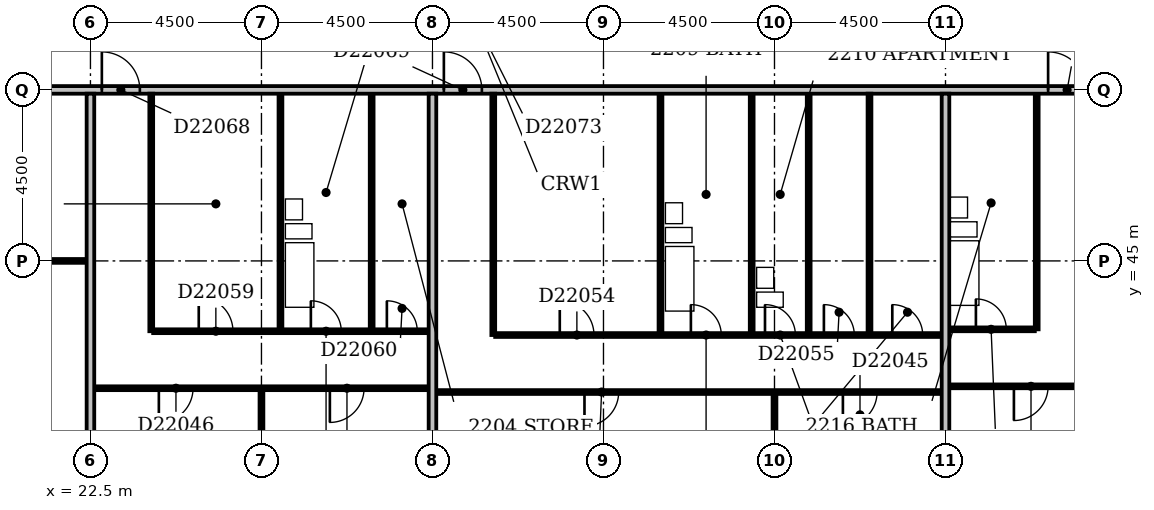
"""IFC4 building model, lengths in metres.
Left out: names, types, materials, properties, quantities, classifications, styles, units other than length and angle.
Written with IfcOpenShell. Run it as: python <this file> out.ifc"""

import sys

from ifc_helpers import new_model, si_unit, direction, frame, frame_2d, origin, place, context, subcontext, project, spatial, rectangle, extrude, element, fill, save


model = new_model("IFC4")
c1 = context("Model", 3, precision=1e-05, world=origin(), true_north=direction((0.0, 1.0)))
c2 = subcontext(c1, "Body", "Model", "MODEL_VIEW")
j1 = project(units=[si_unit("LENGTHUNIT", "METRE"), si_unit("PLANEANGLEUNIT", "RADIAN")], contexts=[c1])
p1 = place(None, origin())
s1 = spatial("IfcSite", under=j1, at=p1, CompositionType="ELEMENT")
p2 = place(p1, origin())
s2 = spatial("IfcBuilding", under=s1, at=p2, CompositionType="ELEMENT")
p3 = place(p2, frame((0.0, 0.0, 90.2)))
s3 = spatial("IfcBuildingStorey", under=s2, at=p3, CompositionType="ELEMENT", Elevation=90.2)
p4 = place(p3, frame((22.5, 36.6, 0.0), z_axis=(0.0, 0.0, 1.0), x_axis=(0.0, 1.0, 0.0)))
e1 = element("IfcWall", 1, at=p4, inside=s3, PredefinedType="PARTITIONING", context=c2, shape_type="SweptSolid", body=[
    extrude(rectangle(XDim=12.8, YDim=0.2, at=frame_2d((6.4, 0.0))), origin(), (0.0, 0.0, 1.0), 3.3),
])
p5 = place(p3, frame((27.0, 36.6, 0.0), z_axis=(0.0, 0.0, 1.0), x_axis=(0.0, 1.0, 0.0)))
e2 = element("IfcWall", 2, at=p5, inside=s3, PredefinedType="PARTITIONING", context=c2, shape_type="SweptSolid", body=[
    extrude(rectangle(XDim=5.0, YDim=0.1, at=frame_2d((2.5, 0.0))), origin(), (0.0, 0.0, 1.0), 2.6),
])
p6 = place(p3, frame((31.5, 36.6, 0.0), z_axis=(0.0, 0.0, 1.0), x_axis=(0.0, 1.0, 0.0)))
e3 = element("IfcWall", 3, at=p6, inside=s3, PredefinedType="PARTITIONING", context=c2, shape_type="SweptSolid", body=[
    extrude(rectangle(XDim=12.8, YDim=0.2, at=frame_2d((6.4, 0.0))), origin(), (0.0, 0.0, 1.0), 3.3),
])
p7 = place(p3, frame((40.5, 36.6, 0.0), z_axis=(0.0, 0.0, 1.0), x_axis=(0.0, 1.0, 0.0)))
e4 = element("IfcWall", 4, at=p7, inside=s3, PredefinedType="PARTITIONING", context=c2, shape_type="SweptSolid", body=[
    extrude(rectangle(XDim=4.9, YDim=0.1, at=frame_2d((2.45, 0.0))), origin(), (0.0, 0.0, 1.0), 3.3),
])
p8 = place(p3, frame((45.0, 36.6, 0.0), z_axis=(0.0, 0.0, 1.0), x_axis=(0.0, 1.0, 0.0)))
e5 = element("IfcWall", 5, at=p8, inside=s3, PredefinedType="PARTITIONING", context=c2, shape_type="SweptSolid", body=[
    extrude(rectangle(XDim=12.8, YDim=0.2, at=frame_2d((6.4, 0.0))), origin(), (0.0, 0.0, 1.0), 2.6),
])
p9 = place(p3, frame((31.6, 41.55, 0.0), z_axis=(0.0, 0.0, 1.0), x_axis=(1.0, 0.0, 0.0)))
e6 = element("IfcWall", 6, at=p9, inside=s3, PredefinedType="PARTITIONING", context=c2, shape_type="SweptSolid", body=[
    extrude(rectangle(XDim=13.3, YDim=0.1, at=frame_2d((6.65, 0.0))), origin(), (0.0, 0.0, 1.0), 3.3),
])
p10 = place(p9, frame((3.9, 0.0, 0.0)))
e7 = element("IfcOpeningElement", 7, at=p10, cuts=e6, PredefinedType="OPENING", context=c2, shape_type="SweptSolid", body=[
    extrude(rectangle(XDim=0.9, YDim=2.1, at=frame_2d((0.45, 1.05))), frame((0.0, 0.062, 0.0), z_axis=(0.0, -1.0, 0.0), x_axis=(1.0, 0.0, 0.0)), (0.0, 0.0, 1.0), 0.124),
])
p11 = place(p9, frame((10.7, 0.0, 0.0)))
e8 = element("IfcOpeningElement", 8, at=p11, cuts=e6, PredefinedType="OPENING", context=c2, shape_type="SweptSolid", body=[
    extrude(rectangle(XDim=0.9, YDim=2.1, at=frame_2d((0.45, 1.05))), frame((0.0, 0.062, 0.0), z_axis=(0.0, -1.0, 0.0), x_axis=(1.0, 0.0, 0.0)), (0.0, 0.0, 1.0), 0.124),
])
p12 = place(p3, frame((22.6, 41.65, 0.0), z_axis=(0.0, 0.0, 1.0), x_axis=(1.0, 0.0, 0.0)))
e9 = element("IfcWall", 9, at=p12, inside=s3, PredefinedType="PARTITIONING", context=c2, shape_type="SweptSolid", body=[
    extrude(rectangle(XDim=8.8, YDim=0.1, at=frame_2d((4.4, 0.0))), origin(), (0.0, 0.0, 1.0), 3.3),
])
p13 = place(p12, frame((1.7, 0.0, 0.0)))
e10 = element("IfcOpeningElement", 10, at=p13, cuts=e9, PredefinedType="OPENING", context=c2, shape_type="SweptSolid", body=[
    extrude(rectangle(XDim=0.9, YDim=2.1, at=frame_2d((0.45, 1.05))), frame((0.0, 0.062, 0.0), z_axis=(0.0, -1.0, 0.0), x_axis=(1.0, 0.0, 0.0)), (0.0, 0.0, 1.0), 0.124),
])
p14 = place(p12, frame((6.2, 0.0, 0.0)))
e11 = element("IfcOpeningElement", 11, at=p14, cuts=e9, PredefinedType="OPENING", context=c2, shape_type="SweptSolid", body=[
    extrude(rectangle(XDim=0.9, YDim=2.1, at=frame_2d((0.45, 1.05))), frame((0.0, 0.062, 0.0), z_axis=(0.0, -1.0, 0.0), x_axis=(1.0, 0.0, 0.0)), (0.0, 0.0, 1.0), 0.124),
])
p15 = place(p3, frame((45.1, 41.7, 0.0), z_axis=(0.0, 0.0, 1.0), x_axis=(1.0, 0.0, 0.0)))
e12 = element("IfcWall", 12, at=p15, inside=s3, PredefinedType="PARTITIONING", context=c2, shape_type="SweptSolid", body=[
    extrude(rectangle(XDim=17.8, YDim=0.1, at=frame_2d((8.9, 0.0))), origin(), (0.0, 0.0, 1.0), 3.3),
])
p16 = place(p15, frame((1.7, 0.0, 0.0)))
e13 = element("IfcOpeningElement", 13, at=p16, cuts=e12, PredefinedType="OPENING", context=c2, shape_type="SweptSolid", body=[
    extrude(rectangle(XDim=0.9, YDim=2.1, at=frame_2d((0.45, 1.05))), frame((0.0, 0.062, 0.0), z_axis=(0.0, -1.0, 0.0), x_axis=(1.0, 0.0, 0.0)), (0.0, 0.0, 1.0), 0.124),
])
p17 = place(p15, frame((6.2, 0.0, 0.0)))
e14 = element("IfcOpeningElement", 14, at=p17, cuts=e12, PredefinedType="OPENING", context=c2, shape_type="SweptSolid", body=[
    extrude(rectangle(XDim=0.9, YDim=2.1, at=frame_2d((0.45, 1.05))), frame((0.0, 0.062, 0.0), z_axis=(0.0, -1.0, 0.0), x_axis=(1.0, 0.0, 0.0)), (0.0, 0.0, 1.0), 0.124),
])
p18 = place(p15, frame((11.85, 0.0, 0.0)))
e15 = element("IfcOpeningElement", 15, at=p18, cuts=e12, PredefinedType="OPENING", context=c2, shape_type="SweptSolid", body=[
    extrude(rectangle(XDim=0.9, YDim=2.1, at=frame_2d((0.45, 1.05))), frame((0.0, 0.062, 0.0), z_axis=(0.0, -1.0, 0.0), x_axis=(1.0, 0.0, 0.0)), (0.0, 0.0, 1.0), 0.124),
])
p19 = place(p15, frame((15.2, 0.0, 0.0)))
e16 = element("IfcOpeningElement", 16, at=p19, cuts=e12, PredefinedType="OPENING", context=c2, shape_type="SweptSolid", body=[
    extrude(rectangle(XDim=0.9, YDim=2.1, at=frame_2d((0.45, 1.05))), frame((0.0, 0.062, 0.0), z_axis=(0.0, -1.0, 0.0), x_axis=(1.0, 0.0, 0.0)), (0.0, 0.0, 1.0), 0.124),
])
p20 = place(p3, frame((33.1, 43.05, 0.0), z_axis=(0.0, 0.0, 1.0), x_axis=(0.0, 1.0, 0.0)))
e17 = element("IfcWall", 17, at=p20, inside=s3, PredefinedType="PARTITIONING", context=c2, shape_type="SweptSolid", body=[
    extrude(rectangle(XDim=6.35, YDim=0.1, at=frame_2d((3.175, 0.0))), origin(), (0.0, 0.0, 1.0), 3.3),
])
p21 = place(p3, frame((33.15, 43.05, 0.0), z_axis=(0.0, 0.0, 1.0), x_axis=(1.0, 0.0, 0.0)))
e18 = element("IfcWall", 18, at=p21, inside=s3, PredefinedType="PARTITIONING", context=c2, shape_type="SweptSolid", body=[
    extrude(rectangle(XDim=11.75, YDim=0.1, at=frame_2d((5.875, 0.0))), origin(), (0.0, 0.0, 1.0), 3.3),
])
p22 = place(p21, frame((5.15, 0.0, 0.0)))
e19 = element("IfcOpeningElement", 19, at=p22, cuts=e18, PredefinedType="OPENING", context=c2, shape_type="SweptSolid", body=[
    extrude(rectangle(XDim=0.8, YDim=2.1, at=frame_2d((0.4, 1.05))), frame((0.0, 0.062, 0.0), z_axis=(0.0, -1.0, 0.0), x_axis=(1.0, 0.0, 0.0)), (0.0, 0.0, 1.0), 0.124),
])
p23 = place(p21, frame((1.7, 0.0, 0.0)))
e20 = element("IfcOpeningElement", 20, at=p23, cuts=e18, PredefinedType="OPENING", context=c2, shape_type="SweptSolid", body=[
    extrude(rectangle(XDim=0.9, YDim=2.1, at=frame_2d((0.45, 1.05))), frame((0.0, 0.062, 0.0), z_axis=(0.0, -1.0, 0.0), x_axis=(1.0, 0.0, 0.0)), (0.0, 0.0, 1.0), 0.124),
])
p24 = place(p21, frame((8.65, 0.0, 0.0)))
e21 = element("IfcOpeningElement", 21, at=p24, cuts=e18, PredefinedType="OPENING", context=c2, shape_type="SweptSolid", body=[
    extrude(rectangle(XDim=0.8, YDim=2.1, at=frame_2d((0.4, 1.05))), frame((0.0, 0.062, 0.0), z_axis=(0.0, -1.0, 0.0), x_axis=(1.0, 0.0, 0.0)), (0.0, 0.0, 1.0), 0.124),
])
p25 = place(p21, frame((10.45, 0.0, 0.0)))
e22 = element("IfcOpeningElement", 22, at=p25, cuts=e18, PredefinedType="OPENING", context=c2, shape_type="SweptSolid", body=[
    extrude(rectangle(XDim=0.8, YDim=2.1, at=frame_2d((0.4, 1.05))), frame((0.0, 0.062, 0.0), z_axis=(0.0, -1.0, 0.0), x_axis=(1.0, 0.0, 0.0)), (0.0, 0.0, 1.0), 0.124),
])
p26 = place(p21, frame((7.1, 0.0, 0.0)))
e23 = element("IfcOpeningElement", 23, at=p26, cuts=e18, PredefinedType="OPENING", context=c2, shape_type="SweptSolid", body=[
    extrude(rectangle(XDim=0.8, YDim=2.1, at=frame_2d((0.4, 1.05))), frame((0.0, 0.062, 0.0), z_axis=(0.0, -1.0, 0.0), x_axis=(1.0, 0.0, 0.0)), (0.0, 0.0, 1.0), 0.124),
])
for number, where, z_axis, x_axis in (
    (24, (37.5, 43.1, 0.0), (0.0, 0.0, 1.0), (0.0, 1.0, 0.0)),
    (25, (39.9, 43.1, 0.0), (0.0, 0.0, 1.0), (0.0, 1.0, 0.0)),
    (26, (41.4, 43.1, 0.0), (0.0, 0.0, 1.0), (0.0, 1.0, 0.0)),
):
    element("IfcWall", number, at=place(p3, frame(where, z_axis=z_axis, x_axis=x_axis)), inside=s3, PredefinedType="PLUMBINGWALL", context=c2, shape_type="SweptSolid", body=[
        extrude(rectangle(XDim=6.3, YDim=0.1, at=frame_2d((3.15, 0.0))), origin(), (0.0, 0.0, 1.0), 3.3),
    ])
p27 = place(p3, frame((43.0, 43.1, 0.0), z_axis=(0.0, 0.0, 1.0), x_axis=(0.0, 1.0, 0.0)))
e27 = element("IfcWall", 27, at=p27, inside=s3, PredefinedType="PARTITIONING", context=c2, shape_type="SweptSolid", body=[
    extrude(rectangle(XDim=6.3, YDim=0.1, at=frame_2d((3.15, 0.0))), origin(), (0.0, 0.0, 1.0), 3.3),
])
p28 = place(p3, frame((24.1, 43.15, 0.0), z_axis=(0.0, 0.0, 1.0), x_axis=(0.0, 1.0, 0.0)))
e28 = element("IfcWall", 28, at=p28, inside=s3, PredefinedType="PARTITIONING", context=c2, shape_type="SweptSolid", body=[
    extrude(rectangle(XDim=6.25, YDim=0.1, at=frame_2d((3.125, 0.0))), origin(), (0.0, 0.0, 1.0), 3.3),
])
p29 = place(p3, frame((24.15, 43.15, 0.0), z_axis=(0.0, 0.0, 1.0), x_axis=(1.0, 0.0, 0.0)))
e29 = element("IfcWall", 29, at=p29, inside=s3, PredefinedType="PARTITIONING", context=c2, shape_type="SweptSolid", body=[
    extrude(rectangle(XDim=7.25, YDim=0.1, at=frame_2d((3.625, 0.0))), origin(), (0.0, 0.0, 1.0), 3.3),
])
p30 = place(p29, frame((4.15, 0.0, 0.0)))
e30 = element("IfcOpeningElement", 30, at=p30, cuts=e29, PredefinedType="OPENING", context=c2, shape_type="SweptSolid", body=[
    extrude(rectangle(XDim=0.8, YDim=2.1, at=frame_2d((0.4, 1.05))), frame((0.0, 0.062, 0.0), z_axis=(0.0, -1.0, 0.0), x_axis=(1.0, 0.0, 0.0)), (0.0, 0.0, 1.0), 0.124),
])
p31 = place(p29, frame((1.2, 0.0, 0.0)))
e31 = element("IfcOpeningElement", 31, at=p31, cuts=e29, PredefinedType="OPENING", context=c2, shape_type="SweptSolid", body=[
    extrude(rectangle(XDim=0.9, YDim=2.1, at=frame_2d((0.45, 1.05))), frame((0.0, 0.062, 0.0), z_axis=(0.0, -1.0, 0.0), x_axis=(1.0, 0.0, 0.0)), (0.0, 0.0, 1.0), 0.124),
])
p32 = place(p29, frame((6.15, 0.0, 0.0)))
e32 = element("IfcOpeningElement", 32, at=p32, cuts=e29, PredefinedType="OPENING", context=c2, shape_type="SweptSolid", body=[
    extrude(rectangle(XDim=0.8, YDim=2.1, at=frame_2d((0.4, 1.05))), frame((0.0, 0.062, 0.0), z_axis=(0.0, -1.0, 0.0), x_axis=(1.0, 0.0, 0.0)), (0.0, 0.0, 1.0), 0.124),
])
p33 = place(p3, frame((27.5, 43.2, 0.0), z_axis=(0.0, 0.0, 1.0), x_axis=(0.0, 1.0, 0.0)))
e33 = element("IfcWall", 33, at=p33, inside=s3, PredefinedType="PLUMBINGWALL", context=c2, shape_type="SweptSolid", body=[
    extrude(rectangle(XDim=6.2, YDim=0.1, at=frame_2d((3.1, 0.0))), origin(), (0.0, 0.0, 1.0), 2.6),
])
p34 = place(p3, frame((29.9, 43.2, 0.0), z_axis=(0.0, 0.0, 1.0), x_axis=(0.0, 1.0, 0.0)))
e34 = element("IfcWall", 34, at=p34, inside=s3, PredefinedType="PLUMBINGWALL", context=c2, shape_type="SweptSolid", body=[
    extrude(rectangle(XDim=6.2, YDim=0.1, at=frame_2d((3.1, 0.0))), origin(), (0.0, 0.0, 1.0), 3.3),
])
p35 = place(p3, frame((45.1, 43.2, 0.0), z_axis=(0.0, 0.0, 1.0), x_axis=(1.0, 0.0, 0.0)))
e35 = element("IfcWall", 35, at=p35, inside=s3, PredefinedType="PARTITIONING", context=c2, shape_type="SweptSolid", body=[
    extrude(rectangle(XDim=2.25, YDim=0.1, at=frame_2d((1.125, 0.0))), origin(), (0.0, 0.0, 1.0), 3.3),
])
p36 = place(p35, frame((0.7, 0.0, 0.0)))
e36 = element("IfcOpeningElement", 36, at=p36, cuts=e35, PredefinedType="OPENING", context=c2, shape_type="SweptSolid", body=[
    extrude(rectangle(XDim=0.8, YDim=2.1, at=frame_2d((0.4, 1.05))), frame((0.0, 0.062, 0.0), z_axis=(0.0, -1.0, 0.0), x_axis=(1.0, 0.0, 0.0)), (0.0, 0.0, 1.0), 0.124),
])
p37 = place(p3, frame((47.4, 43.2, 0.0), z_axis=(0.0, 0.0, 1.0), x_axis=(0.0, 1.0, 0.0)))
e37 = element("IfcWall", 37, at=p37, inside=s3, PredefinedType="PLUMBINGWALL", context=c2, shape_type="SweptSolid", body=[
    extrude(rectangle(XDim=6.2, YDim=0.1, at=frame_2d((3.1, 0.0))), origin(), (0.0, 0.0, 1.0), 3.3),
])
p38 = place(p3, frame((9.1, 45.0, 0.0), z_axis=(0.0, 0.0, 1.0), x_axis=(1.0, 0.0, 0.0)))
e38 = element("IfcWall", 38, at=p38, inside=s3, PredefinedType="PARTITIONING", context=c2, shape_type="SweptSolid", body=[
    extrude(rectangle(XDim=13.3, YDim=0.1, at=frame_2d((6.65, 0.0))), origin(), (0.0, 0.0, 1.0), 3.3),
])
p39 = place(p3, frame((9.1, 49.5, 0.0), z_axis=(0.0, 0.0, 1.0), x_axis=(1.0, 0.0, 0.0)))
e39 = element("IfcWall", 39, at=p39, inside=s3, PredefinedType="PARTITIONING", context=c2, shape_type="SweptSolid", body=[
    extrude(rectangle(XDim=57.8, YDim=0.2, at=frame_2d((28.9, 0.0))), origin(), (0.0, 0.0, 1.0), 3.3),
])
p40 = place(p39, frame((13.7, 0.0, 0.0)))
e40 = element("IfcOpeningElement", 40, at=p40, cuts=e39, PredefinedType="OPENING", context=c2, shape_type="SweptSolid", body=[
    extrude(rectangle(XDim=1.0, YDim=2.1, at=frame_2d((0.5, 1.05))), frame((0.0, 0.112, 0.0), z_axis=(0.0, -1.0, 0.0), x_axis=(1.0, 0.0, 0.0)), (0.0, 0.0, 1.0), 0.224),
])
p41 = place(p39, frame((22.7, 0.0, 0.0)))
e41 = element("IfcOpeningElement", 41, at=p41, cuts=e39, PredefinedType="OPENING", context=c2, shape_type="SweptSolid", body=[
    extrude(rectangle(XDim=1.0, YDim=2.1, at=frame_2d((0.5, 1.05))), frame((0.0, 0.112, 0.0), z_axis=(0.0, -1.0, 0.0), x_axis=(1.0, 0.0, 0.0)), (0.0, 0.0, 1.0), 0.224),
])
p42 = place(p39, frame((38.6, 0.0, 0.0)))
e42 = element("IfcOpeningElement", 42, at=p42, cuts=e39, PredefinedType="OPENING", context=c2, shape_type="SweptSolid", body=[
    extrude(rectangle(XDim=1.0, YDim=2.1, at=frame_2d((0.5, 1.05))), frame((0.0, 0.112, 0.0), z_axis=(0.0, -1.0, 0.0), x_axis=(1.0, 0.0, 0.0)), (0.0, 0.0, 1.0), 0.224),
])
p43 = place(p39, frame((55.45, 0.0, 0.0)))
e43 = element("IfcOpeningElement", 43, at=p43, cuts=e39, PredefinedType="OPENING", context=c2, shape_type="SweptSolid", body=[
    extrude(rectangle(XDim=1.0, YDim=2.1, at=frame_2d((0.5, 1.05))), frame((0.0, 0.112, 0.0), z_axis=(0.0, -1.0, 0.0), x_axis=(1.0, 0.0, 0.0)), (0.0, 0.0, 1.0), 0.224),
])
p44 = place(p39, frame((6.15, 0.0, 0.0)))
e44 = element("IfcOpeningElement", 44, at=p44, cuts=e39, PredefinedType="OPENING", context=c2, shape_type="SweptSolid", body=[
    extrude(rectangle(XDim=0.9, YDim=2.1, at=frame_2d((0.45, 1.05))), frame((0.0, 0.112, 0.0), z_axis=(0.0, -1.0, 0.0), x_axis=(1.0, 0.0, 0.0)), (0.0, 0.0, 1.0), 0.224),
])
p45 = place(p10, frame((0.9, 0.0, 0.0), z_axis=(0.0, 0.0, 1.0), x_axis=(-1.0, 0.0, 0.0)))
e45 = element("IfcDoor", 45, at=p45, inside=s3, OperationType="SINGLE_SWING_RIGHT", PredefinedType="DOOR", context=c2, shape_type="SweptSolid", body=[
    extrude(rectangle(XDim=0.9, YDim=2.1, at=frame_2d((0.45, 1.05))), frame((0.0, 0.025, 0.0), z_axis=(0.0, -1.0, 0.0), x_axis=(1.0, 0.0, 0.0)), (0.0, 0.0, 1.0), 0.05),
])
fill(e7, e45)
p46 = place(p11, frame((0.9, 0.0, 0.0), z_axis=(0.0, 0.0, 1.0), x_axis=(-1.0, 0.0, 0.0)))
e46 = element("IfcDoor", 46, at=p46, inside=s3, OperationType="SINGLE_SWING_RIGHT", PredefinedType="DOOR", context=c2, shape_type="SweptSolid", body=[
    extrude(rectangle(XDim=0.9, YDim=2.1, at=frame_2d((0.45, 1.05))), frame((0.0, 0.025, 0.0), z_axis=(0.0, -1.0, 0.0), x_axis=(1.0, 0.0, 0.0)), (0.0, 0.0, 1.0), 0.05),
])
fill(e8, e46)
p47 = place(p13, frame((0.9, 0.0, 0.0), z_axis=(0.0, 0.0, 1.0), x_axis=(-1.0, 0.0, 0.0)))
e47 = element("IfcDoor", 47, at=p47, inside=s3, OperationType="SINGLE_SWING_RIGHT", PredefinedType="DOOR", context=c2, shape_type="SweptSolid", body=[
    extrude(rectangle(XDim=0.9, YDim=2.1, at=frame_2d((0.45, 1.05))), frame((0.0, 0.025, 0.0), z_axis=(0.0, -1.0, 0.0), x_axis=(1.0, 0.0, 0.0)), (0.0, 0.0, 1.0), 0.05),
])
fill(e10, e47)
p48 = place(p14, frame((0.9, 0.0, 0.0), z_axis=(0.0, 0.0, 1.0), x_axis=(-1.0, 0.0, 0.0)))
e48 = element("IfcDoor", 48, at=p48, inside=s3, OperationType="SINGLE_SWING_RIGHT", PredefinedType="DOOR", context=c2, shape_type="SweptSolid", body=[
    extrude(rectangle(XDim=0.9, YDim=2.1, at=frame_2d((0.45, 1.05))), frame((0.0, 0.025, 0.0), z_axis=(0.0, -1.0, 0.0), x_axis=(1.0, 0.0, 0.0)), (0.0, 0.0, 1.0), 0.05),
])
fill(e11, e48)
p49 = place(p16, frame((0.9, 0.0, 0.0), z_axis=(0.0, 0.0, 1.0), x_axis=(-1.0, 0.0, 0.0)))
e49 = element("IfcDoor", 49, at=p49, inside=s3, OperationType="SINGLE_SWING_RIGHT", PredefinedType="DOOR", context=c2, shape_type="SweptSolid", body=[
    extrude(rectangle(XDim=0.9, YDim=2.1, at=frame_2d((0.45, 1.05))), frame((0.0, 0.025, 0.0), z_axis=(0.0, -1.0, 0.0), x_axis=(1.0, 0.0, 0.0)), (0.0, 0.0, 1.0), 0.05),
])
fill(e13, e49)
p50 = place(p22, origin())
e50 = element("IfcDoor", 50, at=p50, inside=s3, OperationType="SINGLE_SWING_LEFT", PredefinedType="DOOR", context=c2, shape_type="SweptSolid", body=[
    extrude(rectangle(XDim=0.8, YDim=2.1, at=frame_2d((0.4, 1.05))), frame((0.0, 0.025, 0.0), z_axis=(0.0, -1.0, 0.0), x_axis=(1.0, 0.0, 0.0)), (0.0, 0.0, 1.0), 0.05),
])
fill(e19, e50)
p51 = place(p23, origin())
e51 = element("IfcDoor", 51, at=p51, inside=s3, OperationType="SINGLE_SWING_LEFT", PredefinedType="DOOR", context=c2, shape_type="SweptSolid", body=[
    extrude(rectangle(XDim=0.9, YDim=2.1, at=frame_2d((0.45, 1.05))), frame((0.0, 0.025, 0.0), z_axis=(0.0, -1.0, 0.0), x_axis=(1.0, 0.0, 0.0)), (0.0, 0.0, 1.0), 0.05),
])
fill(e20, e51)
p52 = place(p24, origin())
e52 = element("IfcDoor", 52, at=p52, inside=s3, OperationType="SINGLE_SWING_LEFT", PredefinedType="DOOR", context=c2, shape_type="SweptSolid", body=[
    extrude(rectangle(XDim=0.8, YDim=2.1, at=frame_2d((0.4, 1.05))), frame((0.0, 0.025, 0.0), z_axis=(0.0, -1.0, 0.0), x_axis=(1.0, 0.0, 0.0)), (0.0, 0.0, 1.0), 0.05),
])
fill(e21, e52)
p53 = place(p25, origin())
e53 = element("IfcDoor", 53, at=p53, inside=s3, OperationType="SINGLE_SWING_LEFT", PredefinedType="DOOR", context=c2, shape_type="SweptSolid", body=[
    extrude(rectangle(XDim=0.8, YDim=2.1, at=frame_2d((0.4, 1.05))), frame((0.0, 0.025, 0.0), z_axis=(0.0, -1.0, 0.0), x_axis=(1.0, 0.0, 0.0)), (0.0, 0.0, 1.0), 0.05),
])
fill(e22, e53)
p54 = place(p26, origin())
e54 = element("IfcDoor", 54, at=p54, inside=s3, OperationType="SINGLE_SWING_LEFT", PredefinedType="DOOR", context=c2, shape_type="SweptSolid", body=[
    extrude(rectangle(XDim=0.8, YDim=2.1, at=frame_2d((0.4, 1.05))), frame((0.0, 0.025, 0.0), z_axis=(0.0, -1.0, 0.0), x_axis=(1.0, 0.0, 0.0)), (0.0, 0.0, 1.0), 0.05),
])
fill(e23, e54)
p55 = place(p30, origin())
e55 = element("IfcDoor", 55, at=p55, inside=s3, OperationType="SINGLE_SWING_LEFT", PredefinedType="DOOR", context=c2, shape_type="SweptSolid", body=[
    extrude(rectangle(XDim=0.8, YDim=2.1, at=frame_2d((0.4, 1.05))), frame((0.0, 0.025, 0.0), z_axis=(0.0, -1.0, 0.0), x_axis=(1.0, 0.0, 0.0)), (0.0, 0.0, 1.0), 0.05),
])
fill(e30, e55)
p56 = place(p31, origin())
e56 = element("IfcDoor", 56, at=p56, inside=s3, OperationType="SINGLE_SWING_LEFT", PredefinedType="DOOR", context=c2, shape_type="SweptSolid", body=[
    extrude(rectangle(XDim=0.9, YDim=2.1, at=frame_2d((0.45, 1.05))), frame((0.0, 0.025, 0.0), z_axis=(0.0, -1.0, 0.0), x_axis=(1.0, 0.0, 0.0)), (0.0, 0.0, 1.0), 0.05),
])
fill(e31, e56)
p57 = place(p32, origin())
e57 = element("IfcDoor", 57, at=p57, inside=s3, OperationType="SINGLE_SWING_LEFT", PredefinedType="DOOR", context=c2, shape_type="SweptSolid", body=[
    extrude(rectangle(XDim=0.8, YDim=2.1, at=frame_2d((0.4, 1.05))), frame((0.0, 0.025, 0.0), z_axis=(0.0, -1.0, 0.0), x_axis=(1.0, 0.0, 0.0)), (0.0, 0.0, 1.0), 0.05),
])
fill(e32, e57)
p58 = place(p36, origin())
e58 = element("IfcDoor", 58, at=p58, inside=s3, OperationType="SINGLE_SWING_LEFT", PredefinedType="DOOR", context=c2, shape_type="SweptSolid", body=[
    extrude(rectangle(XDim=0.8, YDim=2.1, at=frame_2d((0.4, 1.05))), frame((0.0, 0.025, 0.0), z_axis=(0.0, -1.0, 0.0), x_axis=(1.0, 0.0, 0.0)), (0.0, 0.0, 1.0), 0.05),
])
fill(e36, e58)
p59 = place(p40, origin())
e59 = element("IfcDoor", 59, at=p59, inside=s3, OperationType="SINGLE_SWING_LEFT", PredefinedType="DOOR", context=c2, shape_type="SweptSolid", body=[
    extrude(rectangle(XDim=1.0, YDim=2.1, at=frame_2d((0.5, 1.05))), frame((0.0, 0.025, 0.0), z_axis=(0.0, -1.0, 0.0), x_axis=(1.0, 0.0, 0.0)), (0.0, 0.0, 1.0), 0.05),
])
fill(e40, e59)
p60 = place(p41, origin())
e60 = element("IfcDoor", 60, at=p60, inside=s3, OperationType="SINGLE_SWING_LEFT", PredefinedType="DOOR", context=c2, shape_type="SweptSolid", body=[
    extrude(rectangle(XDim=1.0, YDim=2.1, at=frame_2d((0.5, 1.05))), frame((0.0, 0.025, 0.0), z_axis=(0.0, -1.0, 0.0), x_axis=(1.0, 0.0, 0.0)), (0.0, 0.0, 1.0), 0.05),
])
fill(e41, e60)
p61 = place(p42, origin())
e61 = element("IfcDoor", 61, at=p61, inside=s3, OperationType="SINGLE_SWING_LEFT", PredefinedType="DOOR", context=c2, shape_type="SweptSolid", body=[
    extrude(rectangle(XDim=1.0, YDim=2.1, at=frame_2d((0.5, 1.05))), frame((0.0, 0.025, 0.0), z_axis=(0.0, -1.0, 0.0), x_axis=(1.0, 0.0, 0.0)), (0.0, 0.0, 1.0), 0.05),
])
fill(e42, e61)
save(model, sys.argv[1])
